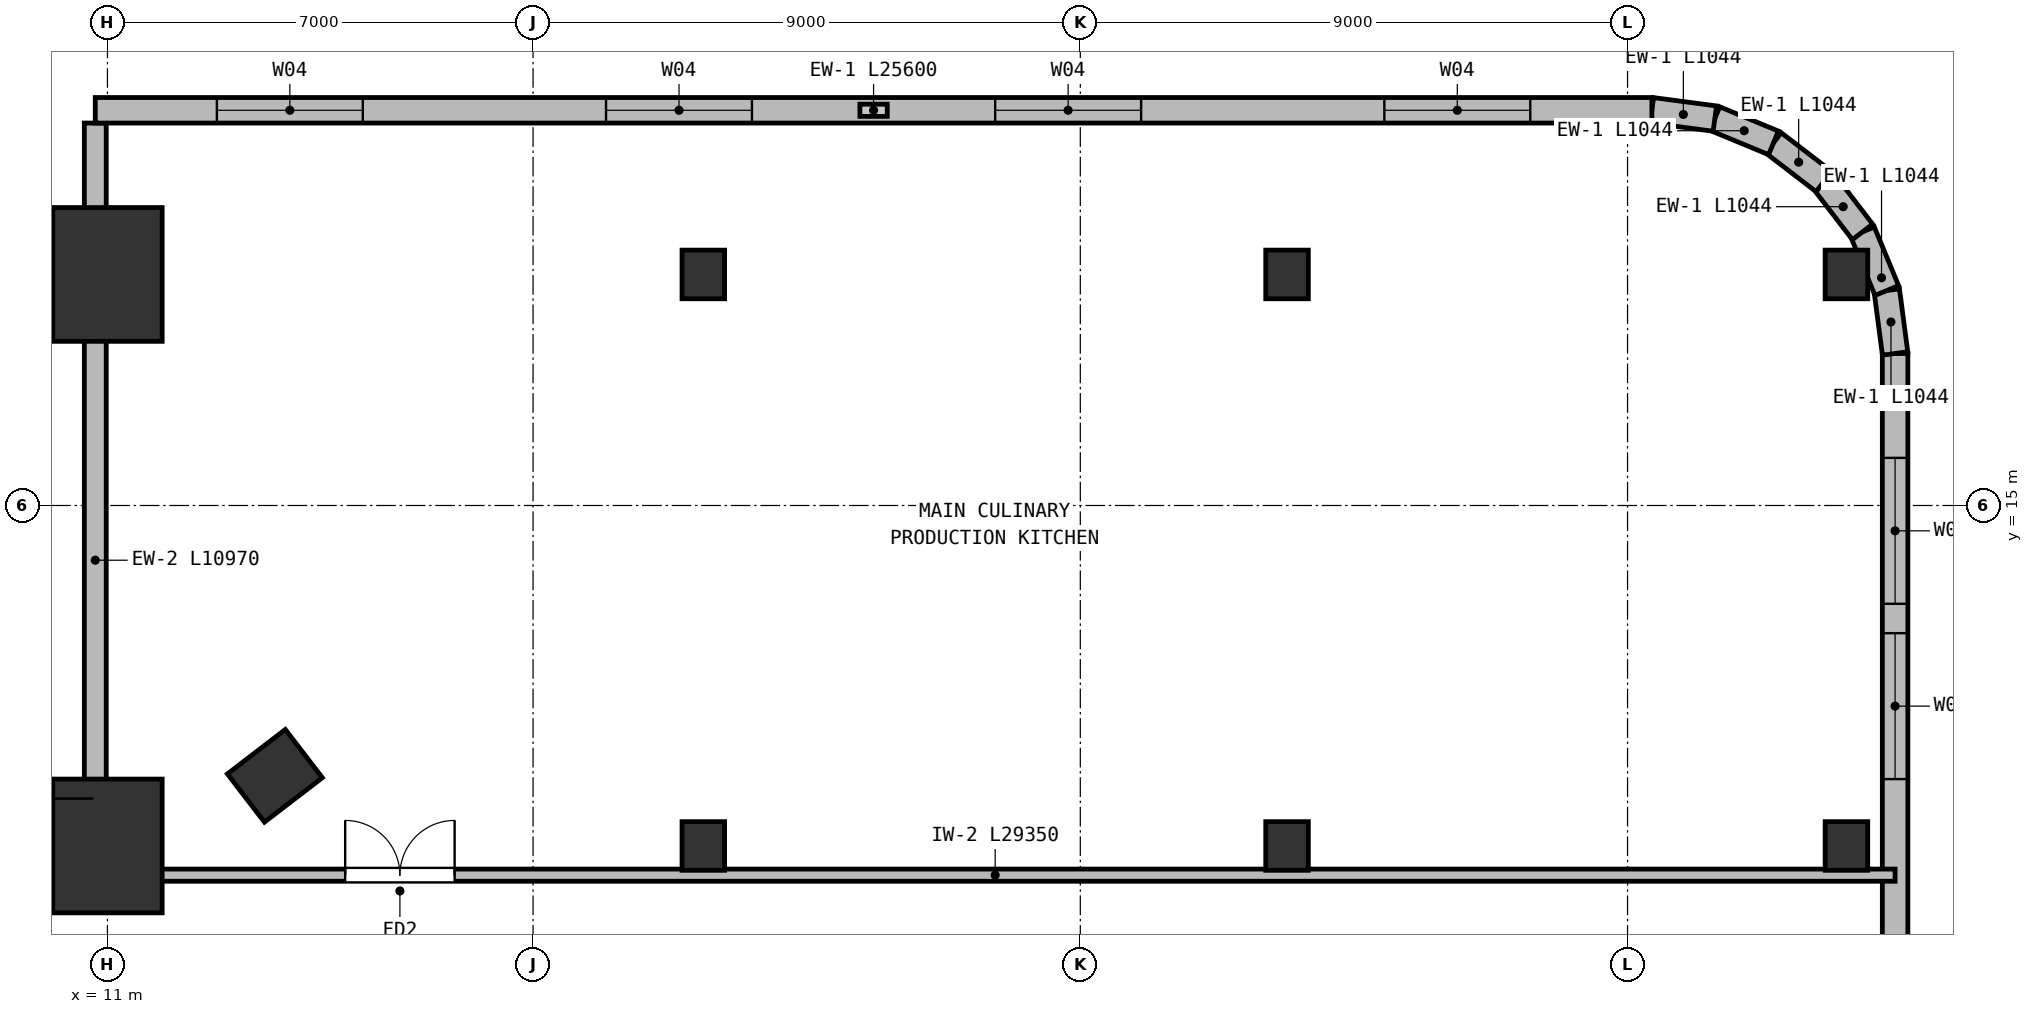
"""IFC4 building model, lengths in metres.
Left out: names, types, materials, properties, quantities, classifications, styles, units other than length and angle.
Written with IfcOpenShell. Run it as: python <this file> out.ifc"""

import sys

from ifc_helpers import new_model, si_unit, direction, frame, frame_2d, origin, origin_2d, place, context, subcontext, project, spatial, rectangle, extrude, element, fill, save


model = new_model("IFC4")
c1 = context("Model", 3, precision=1e-05, world=origin(), true_north=direction((0.0, 1.0)))
c2 = subcontext(c1, "Body", "Model", "MODEL_VIEW")
j1 = project(units=[si_unit("LENGTHUNIT", "METRE"), si_unit("PLANEANGLEUNIT", "RADIAN")], contexts=[c1])
p1 = place(None, origin())
s1 = spatial("IfcSite", under=j1, at=p1, CompositionType="ELEMENT")
p2 = place(p1, origin())
s2 = spatial("IfcBuilding", under=s1, at=p2, CompositionType="ELEMENT")
p3 = place(p2, frame((0.0, 0.0, 6.0)))
s3 = spatial("IfcBuildingStorey", under=s2, at=p3, CompositionType="ELEMENT", Elevation=6.0)
p4 = place(p3, frame((13.754, 10.554, 0.0), z_axis=(0.0, 0.0, 1.0), x_axis=(-0.608761429009, 0.793353340291, 0.0)))
e1 = element("IfcColumn", 1, at=p4, inside=s3, PredefinedType="COLUMN", context=c2, shape_type="SweptSolid", body=[
    extrude(rectangle(XDim=1.0, YDim=1.2, at=origin_2d()), origin(), (0.0, 0.0, 1.0), 5.0),
])
for number, where, z_axis, x_axis in (
    (2, (11.0, 9.4, 0.0), (0.0, 0.0, 1.0), (1.0, 0.0, 0.0)),
    (3, (11.0, 18.8, 0.0), (0.0, 0.0, 1.0), (1.0, 0.0, 0.0)),
):
    element("IfcColumn", number, at=place(p3, frame(where, z_axis=z_axis, x_axis=x_axis)), inside=s3, PredefinedType="COLUMN", context=c2, shape_type="SweptSolid", body=[
        extrude(rectangle(XDim=1.8, YDim=2.2, at=origin_2d()), origin(), (0.0, 0.0, 1.0), 5.0),
    ])
for number, where, z_axis, x_axis in (
    (4, (20.8, 9.4, 0.0), (0.0, 0.0, 1.0), (1.0, 0.0, 0.0)),
    (5, (20.8, 18.8, 0.0), (0.0, 0.0, 1.0), (1.0, 0.0, 0.0)),
    (6, (30.4, 9.4, 0.0), (0.0, 0.0, 1.0), (1.0, 0.0, 0.0)),
    (7, (30.4, 18.8, 0.0), (0.0, 0.0, 1.0), (1.0, 0.0, 0.0)),
    (8, (39.6, 9.4, 0.0), (0.0, 0.0, 1.0), (1.0, 0.0, 0.0)),
    (9, (39.6, 18.8, 0.0), (0.0, 0.0, 1.0), (1.0, 0.0, 0.0)),
):
    element("IfcColumn", number, at=place(p3, frame(where, z_axis=z_axis, x_axis=x_axis)), inside=s3, PredefinedType="COLUMN", context=c2, shape_type="SweptSolid", body=[
        extrude(rectangle(XDim=0.7, YDim=0.8, at=origin_2d()), origin(), (0.0, 0.0, 1.0), 5.0),
    ])
p5 = place(p3, frame((10.8, 21.29, 0.0), z_axis=(0.0, 0.0, 1.0), x_axis=(0.0, -1.0, 0.0)))
e10 = element("IfcWall", 10, at=p5, inside=s3, PredefinedType="SOLIDWALL", context=c2, shape_type="SweptSolid", body=[
    extrude(rectangle(XDim=10.97, YDim=0.36, at=frame_2d((5.485, 0.0))), origin(), (0.0, 0.0, 1.0), 4.1),
])
p6 = place(p3, frame((40.4, 17.5, 0.0), z_axis=(0.0, 0.0, 1.0), x_axis=(0.0, -1.0, 0.0)))
e11 = element("IfcWall", 11, at=p6, inside=s3, PredefinedType="SOLIDWALL", context=c2, shape_type="SweptSolid", body=[
    extrude(rectangle(XDim=35.0, YDim=0.42, at=frame_2d((17.5, 0.0))), origin(), (0.0, 0.0, 1.0), 4.72),
])
p7 = place(p6, frame((1.717, 0.0, 0.95)))
e12 = element("IfcOpeningElement", 12, at=p7, cuts=e11, PredefinedType="OPENING", context=c2, shape_type="SweptSolid", body=[
    extrude(rectangle(XDim=2.4, YDim=2.6, at=frame_2d((1.2, 1.3))), frame((0.0, 0.22, 0.0), z_axis=(0.0, -1.0, 0.0), x_axis=(1.0, 0.0, 0.0)), (0.0, 0.0, 1.0), 0.44),
])
p8 = place(p6, frame((4.6, 0.0, 0.95)))
e13 = element("IfcOpeningElement", 13, at=p8, cuts=e11, PredefinedType="OPENING", context=c2, shape_type="SweptSolid", body=[
    extrude(rectangle(XDim=2.4, YDim=2.6, at=frame_2d((1.2, 1.3))), frame((0.0, 0.22, 0.0), z_axis=(0.0, -1.0, 0.0), x_axis=(1.0, 0.0, 0.0)), (0.0, 0.0, 1.0), 0.44),
])
p9 = place(p6, frame((13.383, 0.0, 0.95)))
e14 = element("IfcOpeningElement", 14, at=p9, cuts=e11, PredefinedType="OPENING", context=c2, shape_type="SweptSolid", body=[
    extrude(rectangle(XDim=2.4, YDim=2.6, at=frame_2d((1.2, 1.3))), frame((0.0, 0.22, 0.0), z_axis=(0.0, -1.0, 0.0), x_axis=(1.0, 0.0, 0.0)), (0.0, 0.0, 1.0), 0.44),
])
p10 = place(p6, frame((19.217, 0.0, 0.95)))
e15 = element("IfcOpeningElement", 15, at=p10, cuts=e11, PredefinedType="OPENING", context=c2, shape_type="SweptSolid", body=[
    extrude(rectangle(XDim=2.4, YDim=2.6, at=frame_2d((1.2, 1.3))), frame((0.0, 0.22, 0.0), z_axis=(0.0, -1.0, 0.0), x_axis=(1.0, 0.0, 0.0)), (0.0, 0.0, 1.0), 0.44),
])
p11 = place(p6, frame((28.0, 0.0, 0.95)))
e16 = element("IfcOpeningElement", 16, at=p11, cuts=e11, PredefinedType="OPENING", context=c2, shape_type="SweptSolid", body=[
    extrude(rectangle(XDim=2.4, YDim=2.6, at=frame_2d((1.2, 1.3))), frame((0.0, 0.22, 0.0), z_axis=(0.0, -1.0, 0.0), x_axis=(1.0, 0.0, 0.0)), (0.0, 0.0, 1.0), 0.44),
])
p12 = place(p6, frame((30.883, 0.0, 0.95)))
e17 = element("IfcOpeningElement", 17, at=p12, cuts=e11, PredefinedType="OPENING", context=c2, shape_type="SweptSolid", body=[
    extrude(rectangle(XDim=2.4, YDim=2.6, at=frame_2d((1.2, 1.3))), frame((0.0, 0.22, 0.0), z_axis=(0.0, -1.0, 0.0), x_axis=(1.0, 0.0, 0.0)), (0.0, 0.0, 1.0), 0.44),
])
p13 = place(p3, frame((40.264, 18.535, 0.0), z_axis=(0.0, 0.0, 1.0), x_axis=(0.130448465198, -0.991455091231, 0.0)))
e18 = element("IfcWall", 18, at=p13, inside=s3, PredefinedType="SOLIDWALL", context=c2, shape_type="SweptSolid", body=[
    extrude(rectangle(XDim=1.044, YDim=0.42, at=frame_2d((0.522, 0.0))), origin(), (0.0, 0.0, 1.0), 4.72),
])
p14 = place(p3, frame((39.864, 19.5, 0.0), z_axis=(0.0, 0.0, 1.0), x_axis=(0.382771688877, -0.923842970528, 0.0)))
e19 = element("IfcWall", 19, at=p14, inside=s3, PredefinedType="SOLIDWALL", context=c2, shape_type="SweptSolid", body=[
    extrude(rectangle(XDim=1.044, YDim=0.42, at=frame_2d((0.522, 0.0))), origin(), (0.0, 0.0, 1.0), 4.72),
])
p15 = place(p3, frame((39.229, 20.328, 0.0), z_axis=(0.0, 0.0, 1.0), x_axis=(0.608681879412, -0.793414374508, 0.0)))
e20 = element("IfcWall", 20, at=p15, inside=s3, PredefinedType="SOLIDWALL", context=c2, shape_type="SweptSolid", body=[
    extrude(rectangle(XDim=1.044, YDim=0.42, at=frame_2d((0.522, 0.0))), origin(), (0.0, 0.0, 1.0), 4.72),
])
p16 = place(p3, frame((38.4, 20.964, 0.0), z_axis=(0.0, 0.0, 1.0), x_axis=(0.793388088797, -0.608716141198, 0.0)))
e21 = element("IfcWall", 21, at=p16, inside=s3, PredefinedType="SOLIDWALL", context=c2, shape_type="SweptSolid", body=[
    extrude(rectangle(XDim=1.044, YDim=0.42, at=frame_2d((0.522, 0.0))), origin(), (0.0, 0.0, 1.0), 4.72),
])
p17 = place(p3, frame((37.435, 21.364, 0.0), z_axis=(0.0, 0.0, 1.0), x_axis=(0.923842970528, -0.382771688877, 0.0)))
e22 = element("IfcWall", 22, at=p17, inside=s3, PredefinedType="SOLIDWALL", context=c2, shape_type="SweptSolid", body=[
    extrude(rectangle(XDim=1.044, YDim=0.42, at=frame_2d((0.522, 0.0))), origin(), (0.0, 0.0, 1.0), 4.72),
])
p18 = place(p3, frame((36.4, 21.5, 0.0), z_axis=(0.0, 0.0, 1.0), x_axis=(0.991455091231, -0.130448465198, 0.0)))
e23 = element("IfcWall", 23, at=p18, inside=s3, PredefinedType="SOLIDWALL", context=c2, shape_type="SweptSolid", body=[
    extrude(rectangle(XDim=1.044, YDim=0.42, at=frame_2d((0.522, 0.0))), origin(), (0.0, 0.0, 1.0), 4.72),
])
p19 = place(p3, frame((10.8, 21.5, 0.0), z_axis=(0.0, 0.0, 1.0), x_axis=(1.0, 0.0, 0.0)))
e24 = element("IfcWall", 24, at=p19, inside=s3, PredefinedType="SOLIDWALL", context=c2, shape_type="SweptSolid", body=[
    extrude(rectangle(XDim=25.6, YDim=0.42, at=frame_2d((12.8, 0.0))), origin(), (0.0, 0.0, 1.0), 4.72),
])
p20 = place(p19, frame((2.0, 0.0, 0.95)))
e25 = element("IfcOpeningElement", 25, at=p20, cuts=e24, PredefinedType="OPENING", context=c2, shape_type="SweptSolid", body=[
    extrude(rectangle(XDim=2.4, YDim=2.6, at=frame_2d((1.2, 1.3))), frame((0.0, 0.22, 0.0), z_axis=(0.0, -1.0, 0.0), x_axis=(1.0, 0.0, 0.0)), (0.0, 0.0, 1.0), 0.44),
])
p21 = place(p19, frame((8.4, 0.0, 0.95)))
e26 = element("IfcOpeningElement", 26, at=p21, cuts=e24, PredefinedType="OPENING", context=c2, shape_type="SweptSolid", body=[
    extrude(rectangle(XDim=2.4, YDim=2.6, at=frame_2d((1.2, 1.3))), frame((0.0, 0.22, 0.0), z_axis=(0.0, -1.0, 0.0), x_axis=(1.0, 0.0, 0.0)), (0.0, 0.0, 1.0), 0.44),
])
p22 = place(p19, frame((14.8, 0.0, 0.95)))
e27 = element("IfcOpeningElement", 27, at=p22, cuts=e24, PredefinedType="OPENING", context=c2, shape_type="SweptSolid", body=[
    extrude(rectangle(XDim=2.4, YDim=2.6, at=frame_2d((1.2, 1.3))), frame((0.0, 0.22, 0.0), z_axis=(0.0, -1.0, 0.0), x_axis=(1.0, 0.0, 0.0)), (0.0, 0.0, 1.0), 0.44),
])
p23 = place(p19, frame((21.2, 0.0, 0.95)))
e28 = element("IfcOpeningElement", 28, at=p23, cuts=e24, PredefinedType="OPENING", context=c2, shape_type="SweptSolid", body=[
    extrude(rectangle(XDim=2.4, YDim=2.6, at=frame_2d((1.2, 1.3))), frame((0.0, 0.22, 0.0), z_axis=(0.0, -1.0, 0.0), x_axis=(1.0, 0.0, 0.0)), (0.0, 0.0, 1.0), 0.44),
])
p24 = place(p3, frame((11.05, 8.92, 0.0), z_axis=(0.0, 0.0, 1.0), x_axis=(1.0, 0.0, 0.0)))
e29 = element("IfcWall", 29, at=p24, inside=s3, PredefinedType="PARTITIONING", context=c2, shape_type="SweptSolid", body=[
    extrude(rectangle(XDim=29.35, YDim=0.2, at=frame_2d((14.675, 0.0))), origin(), (0.0, 0.0, 1.0), 4.72),
])
p25 = place(p24, frame((3.86, 0.0, 0.0)))
e30 = element("IfcOpeningElement", 30, at=p25, cuts=e29, PredefinedType="OPENING", context=c2, shape_type="SweptSolid", body=[
    extrude(rectangle(XDim=1.8, YDim=2.2, at=frame_2d((0.9, 1.1))), frame((0.0, 0.11, 0.0), z_axis=(0.0, -1.0, 0.0), x_axis=(1.0, 0.0, 0.0)), (0.0, 0.0, 1.0), 0.22),
])
p26 = place(p7, origin())
e31 = element("IfcWindow", 31, at=p26, inside=s3, PartitioningType="SINGLE_PANEL", PredefinedType="WINDOW", context=c2, shape_type="SweptSolid", body=[
    extrude(rectangle(XDim=2.4, YDim=2.6, at=frame_2d((1.2, 1.3))), frame((0.0, 0.03, 0.0), z_axis=(0.0, -1.0, 0.0), x_axis=(1.0, 0.0, 0.0)), (0.0, 0.0, 1.0), 0.06),
])
fill(e12, e31)
p27 = place(p8, origin())
e32 = element("IfcWindow", 32, at=p27, inside=s3, PartitioningType="SINGLE_PANEL", PredefinedType="WINDOW", context=c2, shape_type="SweptSolid", body=[
    extrude(rectangle(XDim=2.4, YDim=2.6, at=frame_2d((1.2, 1.3))), frame((0.0, 0.03, 0.0), z_axis=(0.0, -1.0, 0.0), x_axis=(1.0, 0.0, 0.0)), (0.0, 0.0, 1.0), 0.06),
])
fill(e13, e32)
p28 = place(p20, origin())
e33 = element("IfcWindow", 33, at=p28, inside=s3, PartitioningType="SINGLE_PANEL", PredefinedType="WINDOW", context=c2, shape_type="SweptSolid", body=[
    extrude(rectangle(XDim=2.4, YDim=2.6, at=frame_2d((1.2, 1.3))), frame((0.0, 0.03, 0.0), z_axis=(0.0, -1.0, 0.0), x_axis=(1.0, 0.0, 0.0)), (0.0, 0.0, 1.0), 0.06),
])
fill(e25, e33)
p29 = place(p21, origin())
e34 = element("IfcWindow", 34, at=p29, inside=s3, PartitioningType="SINGLE_PANEL", PredefinedType="WINDOW", context=c2, shape_type="SweptSolid", body=[
    extrude(rectangle(XDim=2.4, YDim=2.6, at=frame_2d((1.2, 1.3))), frame((0.0, 0.03, 0.0), z_axis=(0.0, -1.0, 0.0), x_axis=(1.0, 0.0, 0.0)), (0.0, 0.0, 1.0), 0.06),
])
fill(e26, e34)
p30 = place(p22, origin())
e35 = element("IfcWindow", 35, at=p30, inside=s3, PartitioningType="SINGLE_PANEL", PredefinedType="WINDOW", context=c2, shape_type="SweptSolid", body=[
    extrude(rectangle(XDim=2.4, YDim=2.6, at=frame_2d((1.2, 1.3))), frame((0.0, 0.03, 0.0), z_axis=(0.0, -1.0, 0.0), x_axis=(1.0, 0.0, 0.0)), (0.0, 0.0, 1.0), 0.06),
])
fill(e27, e35)
p31 = place(p23, origin())
e36 = element("IfcWindow", 36, at=p31, inside=s3, PartitioningType="SINGLE_PANEL", PredefinedType="WINDOW", context=c2, shape_type="SweptSolid", body=[
    extrude(rectangle(XDim=2.4, YDim=2.6, at=frame_2d((1.2, 1.3))), frame((0.0, 0.03, 0.0), z_axis=(0.0, -1.0, 0.0), x_axis=(1.0, 0.0, 0.0)), (0.0, 0.0, 1.0), 0.06),
])
fill(e28, e36)
p32 = place(p25, origin())
e37 = element("IfcDoor", 37, at=p32, inside=s3, OperationType="DOUBLE_DOOR_SINGLE_SWING", PredefinedType="DOOR", context=c2, shape_type="SweptSolid", body=[
    extrude(rectangle(XDim=1.8, YDim=2.2, at=frame_2d((0.9, 1.1))), frame((0.0, 0.025, 0.0), z_axis=(0.0, -1.0, 0.0), x_axis=(1.0, 0.0, 0.0)), (0.0, 0.0, 1.0), 0.05),
])
fill(e30, e37)
save(model, sys.argv[1])
